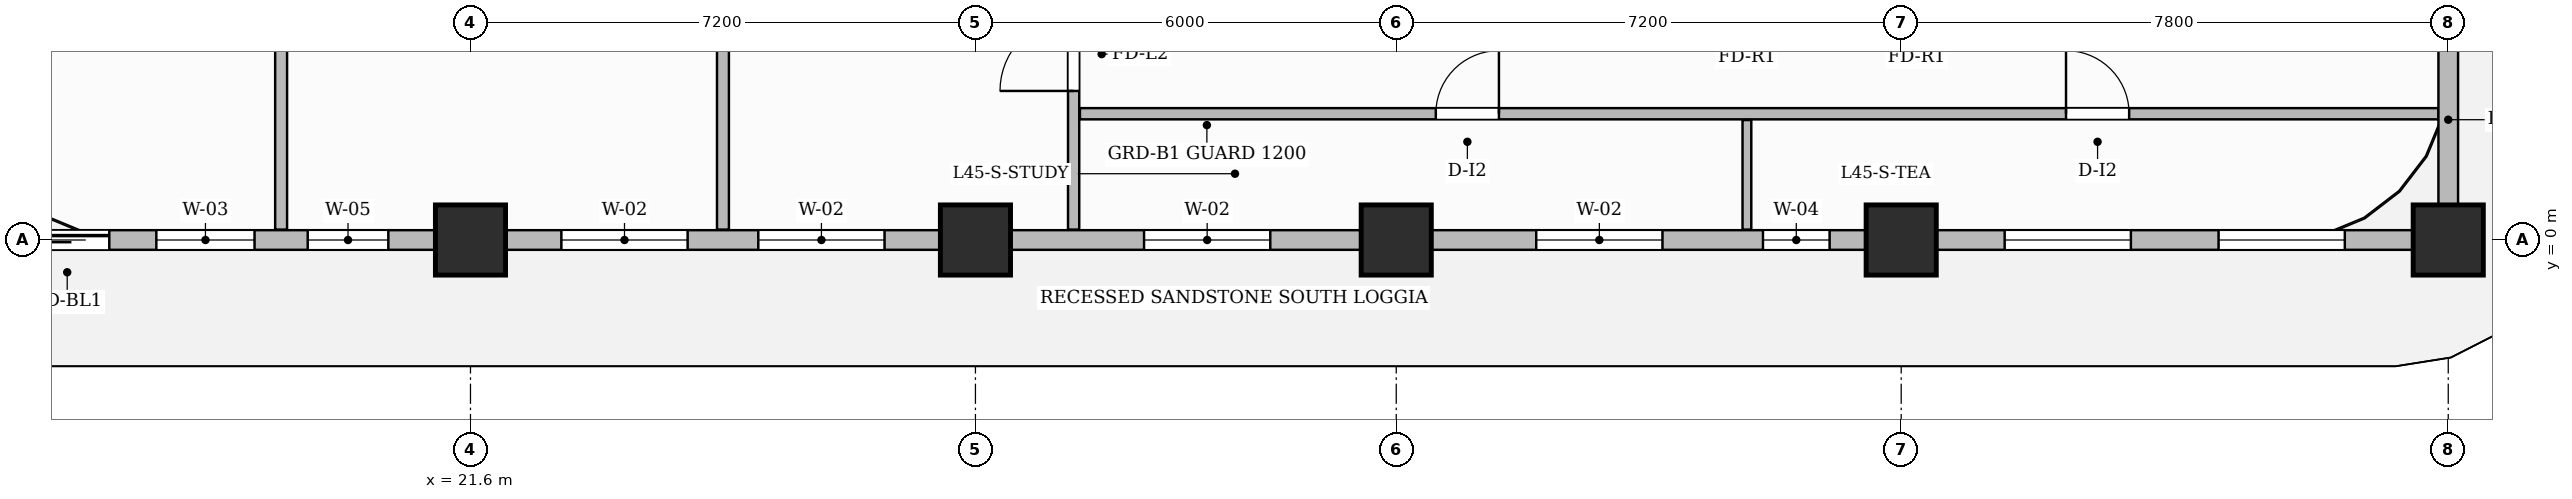
"""IFC4 building model, lengths in metres.
Left out: names, types, materials, properties, quantities, classifications, styles, units other than length and angle.
Written with IfcOpenShell. Run it as: python <this file> out.ifc"""

import sys

from ifc_helpers import new_model, si_unit, direction, frame, frame_2d, origin, origin_2d, place, context, subcontext, project, spatial, rectangle, extrude, source, transform, mapped, element, fill, save


model = new_model("IFC4")
c1 = context("Model", 3, precision=1e-05, world=origin(), true_north=direction((0.0, 1.0)))
c2 = subcontext(c1, "Body", "Model", "MODEL_VIEW")
j1 = project(units=[si_unit("LENGTHUNIT", "METRE"), si_unit("PLANEANGLEUNIT", "RADIAN")], contexts=[c1])
p1 = place(None, origin())
s1 = spatial("IfcSite", under=j1, at=p1, CompositionType="ELEMENT")
p2 = place(p1, origin())
s2 = spatial("IfcBuilding", under=s1, at=p2, CompositionType="ELEMENT")
p3 = place(p2, frame((0.0, 0.0, 181.1)))
s3 = spatial("IfcBuildingStorey", under=s2, at=p3, CompositionType="ELEMENT", Elevation=181.1)
m1 = source(origin(), c2, "Body", "SweptSolid", [
    extrude(rectangle(XDim=1.0, YDim=1.0, at=origin_2d()), origin(), (0.0, 0.0, 1.0), 3.85),
])
for number, where, z_axis, x_axis in (
    (1, (21.6, 0.0, 0.0), (0.0, 0.0, 1.0), (1.0, 0.0, 0.0)),
    (2, (28.8, 0.0, 0.0), (0.0, 0.0, 1.0), (1.0, 0.0, 0.0)),
    (3, (34.8, 0.0, 0.0), (0.0, 0.0, 1.0), (1.0, 0.0, 0.0)),
    (4, (42.0, 0.0, 0.0), (0.0, 0.0, 1.0), (1.0, 0.0, 0.0)),
    (5, (49.8, 0.0, 0.0), (0.0, 0.0, 1.0), (1.0, 0.0, 0.0)),
):
    element("IfcColumn", number, at=place(p3, frame(where, z_axis=z_axis, x_axis=x_axis)), inside=s3, PredefinedType="COLUMN", context=c2, shape_type="MappedRepresentation", body=[
        mapped(m1, transform((0.0, 0.0, 0.0), scale=1.0)),
    ])
p4 = place(p3, frame((30.2, 0.148, 0.0), z_axis=(0.0, 0.0, 1.0), x_axis=(0.0, 1.0, 0.0)))
e6 = element("IfcWall", 6, at=p4, inside=s3, PredefinedType="PARTITIONING", context=c2, shape_type="SweptSolid", body=[
    extrude(rectangle(XDim=10.112, YDim=0.16, at=frame_2d((5.056, 0.0))), origin(), (0.0, 0.0, 1.0), 3.6),
])
p5 = place(p4, frame((1.977, 0.0, 0.0)))
e7 = element("IfcOpeningElement", 7, at=p5, cuts=e6, PredefinedType="OPENING", context=c2, shape_type="SweptSolid", body=[
    extrude(rectangle(XDim=1.05, YDim=2.15, at=frame_2d((0.525, 1.075))), frame((0.0, 0.09, 0.0), z_axis=(0.0, -1.0, 0.0), x_axis=(1.0, 0.0, 0.0)), (0.0, 0.0, 1.0), 0.18),
])
p6 = place(p3, frame((30.29, 1.8, 0.0), z_axis=(0.0, 0.0, 1.0), x_axis=(1.0, 0.0, 0.0)))
e8 = element("IfcWall", 8, at=p6, inside=s3, PredefinedType="PARTITIONING", context=c2, shape_type="SweptSolid", body=[
    extrude(rectangle(XDim=19.37, YDim=0.16, at=frame_2d((9.685, 0.0))), origin(), (0.0, 0.0, 1.0), 3.6),
])
p7 = place(p6, frame((5.074, 0.0, 0.0)))
e9 = element("IfcOpeningElement", 9, at=p7, cuts=e8, PredefinedType="OPENING", context=c2, shape_type="SweptSolid", body=[
    extrude(rectangle(XDim=0.9, YDim=2.15, at=frame_2d((0.45, 1.075))), frame((0.0, 0.09, 0.0), z_axis=(0.0, -1.0, 0.0), x_axis=(1.0, 0.0, 0.0)), (0.0, 0.0, 1.0), 0.18),
])
p8 = place(p6, frame((14.06, 0.0, 0.0)))
e10 = element("IfcOpeningElement", 10, at=p8, cuts=e8, PredefinedType="OPENING", context=c2, shape_type="SweptSolid", body=[
    extrude(rectangle(XDim=0.9, YDim=2.15, at=frame_2d((0.45, 1.075))), frame((0.0, 0.09, 0.0), z_axis=(0.0, -1.0, 0.0), x_axis=(1.0, 0.0, 0.0)), (0.0, 0.0, 1.0), 0.18),
])
p9 = place(p3, frame((39.8, 0.148, 0.0), z_axis=(0.0, 0.0, 1.0), x_axis=(0.0, 1.0, 0.0)))
e11 = element("IfcWall", 11, at=p9, inside=s3, PredefinedType="PARTITIONING", context=c2, shape_type="SweptSolid", body=[
    extrude(rectangle(XDim=1.562, YDim=0.125, at=frame_2d((0.781, 0.0))), origin(), (0.0, 0.0, 1.0), 3.6),
])
p10 = place(p3, frame((18.9, 0.148, 0.0), z_axis=(0.0, 0.0, 1.0), x_axis=(0.0, 1.0, 0.0)))
e12 = element("IfcWall", 12, at=p10, inside=s3, PredefinedType="PARTITIONING", context=c2, shape_type="SweptSolid", body=[
    extrude(rectangle(XDim=10.112, YDim=0.17, at=frame_2d((5.056, 0.0))), origin(), (0.0, 0.0, 1.0), 3.6),
])
p11 = place(p3, frame((25.2, 0.148, 0.0), z_axis=(0.0, 0.0, 1.0), x_axis=(0.0, 1.0, 0.0)))
e13 = element("IfcWall", 13, at=p11, inside=s3, PredefinedType="PARTITIONING", context=c2, shape_type="SweptSolid", body=[
    extrude(rectangle(XDim=10.112, YDim=0.17, at=frame_2d((5.056, 0.0))), origin(), (0.0, 0.0, 1.0), 3.285),
])
p12 = place(p3, frame((14.4, 0.0, 0.0), z_axis=(0.0, 0.0, 1.0), x_axis=(1.0, 0.0, 0.0)))
e14 = element("IfcWall", 14, at=p12, inside=s3, PredefinedType="SOLIDWALL", context=c2, shape_type="SweptSolid", body=[
    extrude(rectangle(XDim=35.4, YDim=0.28, at=frame_2d((17.7, 0.0))), origin(), (0.0, 0.0, 1.0), 3.085),
])
p13 = place(p12, frame((0.85, 0.0, 0.0)))
e15 = element("IfcOpeningElement", 15, at=p13, cuts=e14, PredefinedType="OPENING", context=c2, shape_type="SweptSolid", body=[
    extrude(rectangle(XDim=1.2, YDim=2.2, at=frame_2d((0.6, 1.1))), frame((0.0, 0.15, 0.0), z_axis=(0.0, -1.0, 0.0), x_axis=(1.0, 0.0, 0.0)), (0.0, 0.0, 1.0), 0.3),
])
p14 = place(p12, frame((2.721, 0.0, 0.8)))
e16 = element("IfcOpeningElement", 16, at=p14, cuts=e14, PredefinedType="OPENING", context=c2, shape_type="SweptSolid", body=[
    extrude(rectangle(XDim=1.4, YDim=1.85, at=frame_2d((0.7, 0.925))), frame((0.0, 0.15, 0.0), z_axis=(0.0, -1.0, 0.0), x_axis=(1.0, 0.0, 0.0)), (0.0, 0.0, 1.0), 0.3),
])
p15 = place(p12, frame((4.879, 0.0, 0.8)))
e17 = element("IfcOpeningElement", 17, at=p15, cuts=e14, PredefinedType="OPENING", context=c2, shape_type="SweptSolid", body=[
    extrude(rectangle(XDim=1.15, YDim=1.8, at=frame_2d((0.575, 0.9))), frame((0.0, 0.15, 0.0), z_axis=(0.0, -1.0, 0.0), x_axis=(1.0, 0.0, 0.0)), (0.0, 0.0, 1.0), 0.3),
])
p16 = place(p12, frame((8.496, 0.0, 0.8)))
e18 = element("IfcOpeningElement", 18, at=p16, cuts=e14, PredefinedType="OPENING", context=c2, shape_type="SweptSolid", body=[
    extrude(rectangle(XDim=1.8, YDim=1.85, at=frame_2d((0.9, 0.925))), frame((0.0, 0.15, 0.0), z_axis=(0.0, -1.0, 0.0), x_axis=(1.0, 0.0, 0.0)), (0.0, 0.0, 1.0), 0.3),
])
p17 = place(p12, frame((11.304, 0.0, 0.8)))
e19 = element("IfcOpeningElement", 19, at=p17, cuts=e14, PredefinedType="OPENING", context=c2, shape_type="SweptSolid", body=[
    extrude(rectangle(XDim=1.8, YDim=1.85, at=frame_2d((0.9, 0.925))), frame((0.0, 0.15, 0.0), z_axis=(0.0, -1.0, 0.0), x_axis=(1.0, 0.0, 0.0)), (0.0, 0.0, 1.0), 0.3),
])
p18 = place(p12, frame((16.804, 0.0, 0.8)))
e20 = element("IfcOpeningElement", 20, at=p18, cuts=e14, PredefinedType="OPENING", context=c2, shape_type="SweptSolid", body=[
    extrude(rectangle(XDim=1.8, YDim=1.85, at=frame_2d((0.9, 0.925))), frame((0.0, 0.15, 0.0), z_axis=(0.0, -1.0, 0.0), x_axis=(1.0, 0.0, 0.0)), (0.0, 0.0, 1.0), 0.3),
])
p19 = place(p12, frame((22.396, 0.0, 0.8)))
e21 = element("IfcOpeningElement", 21, at=p19, cuts=e14, PredefinedType="OPENING", context=c2, shape_type="SweptSolid", body=[
    extrude(rectangle(XDim=1.8, YDim=1.85, at=frame_2d((0.9, 0.925))), frame((0.0, 0.15, 0.0), z_axis=(0.0, -1.0, 0.0), x_axis=(1.0, 0.0, 0.0)), (0.0, 0.0, 1.0), 0.3),
])
p20 = place(p12, frame((25.629, 0.0, 0.8)))
e22 = element("IfcOpeningElement", 22, at=p20, cuts=e14, PredefinedType="OPENING", context=c2, shape_type="SweptSolid", body=[
    extrude(rectangle(XDim=0.95, YDim=1.75, at=frame_2d((0.475, 0.875))), frame((0.0, 0.15, 0.0), z_axis=(0.0, -1.0, 0.0), x_axis=(1.0, 0.0, 0.0)), (0.0, 0.0, 1.0), 0.3),
])
p21 = place(p12, frame((29.075, 0.0, 0.8)))
e23 = element("IfcOpeningElement", 23, at=p21, cuts=e14, PredefinedType="OPENING", context=c2, shape_type="SweptSolid", body=[
    extrude(rectangle(XDim=1.8, YDim=1.85, at=frame_2d((0.9, 0.925))), frame((0.0, 0.15, 0.0), z_axis=(0.0, -1.0, 0.0), x_axis=(1.0, 0.0, 0.0)), (0.0, 0.0, 1.0), 0.3),
])
p22 = place(p12, frame((32.125, 0.0, 0.8)))
e24 = element("IfcOpeningElement", 24, at=p22, cuts=e14, PredefinedType="OPENING", context=c2, shape_type="SweptSolid", body=[
    extrude(rectangle(XDim=1.8, YDim=1.85, at=frame_2d((0.9, 0.925))), frame((0.0, 0.15, 0.0), z_axis=(0.0, -1.0, 0.0), x_axis=(1.0, 0.0, 0.0)), (0.0, 0.0, 1.0), 0.3),
])
p23 = place(p3, frame((49.8, 0.05, 0.0), z_axis=(0.0, 0.0, 1.0), x_axis=(0.0, 1.0, 0.0)))
e25 = element("IfcWall", 25, at=p23, inside=s3, PredefinedType="SOLIDWALL", context=c2, shape_type="SweptSolid", body=[
    extrude(rectangle(XDim=3.33, YDim=0.28, at=frame_2d((1.665, 0.0))), origin(), (0.0, 0.0, 1.0), 3.6),
])
m2 = source(origin(), c2, "Body", "SweptSolid", [
    extrude(rectangle(XDim=1.05, YDim=2.15, at=frame_2d((0.525, 1.075))), frame((0.0, 0.025, 0.0), z_axis=(0.0, -1.0, 0.0), x_axis=(1.0, 0.0, 0.0)), (0.0, 0.0, 1.0), 0.05),
])
p24 = place(p5, origin())
e26 = element("IfcDoor", 26, at=p24, inside=s3, OperationType="SINGLE_SWING_LEFT", PredefinedType="DOOR", context=c2, shape_type="MappedRepresentation", body=[
    mapped(m2, transform((0.0, 0.0, 0.0), scale=1.0)),
])
fill(e7, e26)
m3 = source(origin(), c2, "Body", "SweptSolid", [
    extrude(rectangle(XDim=0.9, YDim=2.15, at=frame_2d((0.45, 1.075))), frame((0.0, 0.025, 0.0), z_axis=(0.0, -1.0, 0.0), x_axis=(1.0, 0.0, 0.0)), (0.0, 0.0, 1.0), 0.05),
])
p25 = place(p7, origin())
e27 = element("IfcDoor", 27, at=p25, inside=s3, OperationType="SINGLE_SWING_RIGHT", PredefinedType="DOOR", context=c2, shape_type="MappedRepresentation", body=[
    mapped(m3, transform((0.0, 0.0, 0.0), scale=1.0)),
])
fill(e9, e27)
p26 = place(p8, origin())
e28 = element("IfcDoor", 28, at=p26, inside=s3, OperationType="SINGLE_SWING_LEFT", PredefinedType="DOOR", context=c2, shape_type="MappedRepresentation", body=[
    mapped(m3, transform((0.0, 0.0, 0.0), scale=1.0)),
])
fill(e10, e28)
m4 = source(origin(), c2, "Body", "SweptSolid", [
    extrude(rectangle(XDim=1.2, YDim=2.2, at=frame_2d((0.6, 1.1))), frame((0.0, 0.025, 0.0), z_axis=(0.0, -1.0, 0.0), x_axis=(1.0, 0.0, 0.0)), (0.0, 0.0, 1.0), 0.05),
])
p27 = place(p13, origin())
e29 = element("IfcDoor", 29, at=p27, inside=s3, OperationType="SLIDING_TO_LEFT", PredefinedType="DOOR", context=c2, shape_type="MappedRepresentation", body=[
    mapped(m4, transform((0.0, 0.0, 0.0), scale=1.0)),
])
fill(e15, e29)
m5 = source(origin(), c2, "Body", "SweptSolid", [
    extrude(rectangle(XDim=1.4, YDim=1.85, at=frame_2d((0.7, 0.925))), frame((0.0, 0.03, 0.0), z_axis=(0.0, -1.0, 0.0), x_axis=(1.0, 0.0, 0.0)), (0.0, 0.0, 1.0), 0.06),
])
p28 = place(p14, origin())
e30 = element("IfcWindow", 30, at=p28, inside=s3, PartitioningType="SINGLE_PANEL", PredefinedType="WINDOW", context=c2, shape_type="MappedRepresentation", body=[
    mapped(m5, transform((0.0, 0.0, 0.0), scale=1.0)),
])
fill(e16, e30)
m6 = source(origin(), c2, "Body", "SweptSolid", [
    extrude(rectangle(XDim=1.15, YDim=1.8, at=frame_2d((0.575, 0.9))), frame((0.0, 0.03, 0.0), z_axis=(0.0, -1.0, 0.0), x_axis=(1.0, 0.0, 0.0)), (0.0, 0.0, 1.0), 0.06),
])
p29 = place(p15, origin())
e31 = element("IfcWindow", 31, at=p29, inside=s3, PartitioningType="SINGLE_PANEL", PredefinedType="WINDOW", context=c2, shape_type="MappedRepresentation", body=[
    mapped(m6, transform((0.0, 0.0, 0.0), scale=1.0)),
])
fill(e17, e31)
m7 = source(origin(), c2, "Body", "SweptSolid", [
    extrude(rectangle(XDim=1.8, YDim=1.85, at=frame_2d((0.9, 0.925))), frame((0.0, 0.03, 0.0), z_axis=(0.0, -1.0, 0.0), x_axis=(1.0, 0.0, 0.0)), (0.0, 0.0, 1.0), 0.06),
])
p30 = place(p16, origin())
e32 = element("IfcWindow", 32, at=p30, inside=s3, PartitioningType="DOUBLE_PANEL_VERTICAL", PredefinedType="WINDOW", context=c2, shape_type="MappedRepresentation", body=[
    mapped(m7, transform((0.0, 0.0, 0.0), scale=1.0)),
])
fill(e18, e32)
p31 = place(p17, origin())
e33 = element("IfcWindow", 33, at=p31, inside=s3, PartitioningType="DOUBLE_PANEL_VERTICAL", PredefinedType="WINDOW", context=c2, shape_type="MappedRepresentation", body=[
    mapped(m7, transform((0.0, 0.0, 0.0), scale=1.0)),
])
fill(e19, e33)
p32 = place(p18, origin())
e34 = element("IfcWindow", 34, at=p32, inside=s3, PartitioningType="DOUBLE_PANEL_VERTICAL", PredefinedType="WINDOW", context=c2, shape_type="MappedRepresentation", body=[
    mapped(m7, transform((0.0, 0.0, 0.0), scale=1.0)),
])
fill(e20, e34)
p33 = place(p19, origin())
e35 = element("IfcWindow", 35, at=p33, inside=s3, PartitioningType="DOUBLE_PANEL_VERTICAL", PredefinedType="WINDOW", context=c2, shape_type="MappedRepresentation", body=[
    mapped(m7, transform((0.0, 0.0, 0.0), scale=1.0)),
])
fill(e21, e35)
m8 = source(origin(), c2, "Body", "SweptSolid", [
    extrude(rectangle(XDim=0.95, YDim=1.75, at=frame_2d((0.475, 0.875))), frame((0.0, 0.03, 0.0), z_axis=(0.0, -1.0, 0.0), x_axis=(1.0, 0.0, 0.0)), (0.0, 0.0, 1.0), 0.06),
])
p34 = place(p20, origin())
e36 = element("IfcWindow", 36, at=p34, inside=s3, PartitioningType="SINGLE_PANEL", PredefinedType="WINDOW", context=c2, shape_type="MappedRepresentation", body=[
    mapped(m8, transform((0.0, 0.0, 0.0), scale=1.0)),
])
fill(e22, e36)
p35 = place(p21, origin())
e37 = element("IfcWindow", 37, at=p35, inside=s3, PartitioningType="DOUBLE_PANEL_VERTICAL", PredefinedType="WINDOW", context=c2, shape_type="MappedRepresentation", body=[
    mapped(m7, transform((0.0, 0.0, 0.0), scale=1.0)),
])
fill(e23, e37)
p36 = place(p22, origin())
e38 = element("IfcWindow", 38, at=p36, inside=s3, PartitioningType="DOUBLE_PANEL_VERTICAL", PredefinedType="WINDOW", context=c2, shape_type="MappedRepresentation", body=[
    mapped(m7, transform((0.0, 0.0, 0.0), scale=1.0)),
])
fill(e24, e38)
save(model, sys.argv[1])
